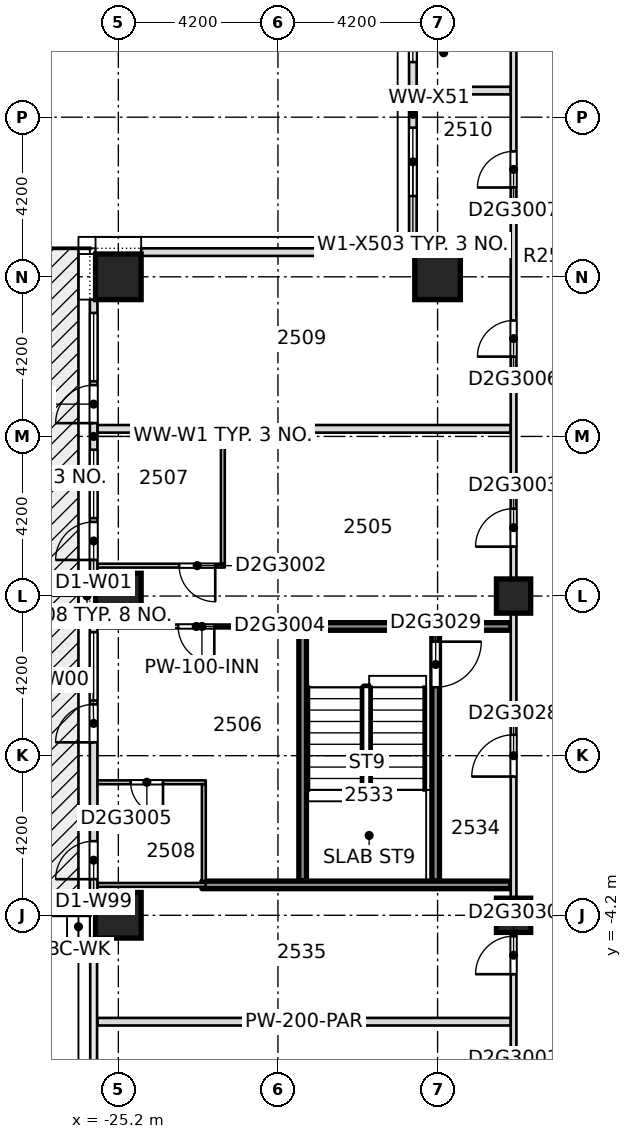
"""IFC4 building model, lengths in metres.
Left out: names, types, materials, properties, quantities, classifications, styles, units other than length and angle.
Written with IfcOpenShell. Run it as: python <this file> out.ifc"""

import sys

from ifc_helpers import new_model, si_unit, direction, frame, frame_2d, origin, origin_2d, place, context, subcontext, project, spatial, rectangle, extrude, element, fill, save


model = new_model("IFC4")
c1 = context("Model", 3, precision=1e-05, world=origin(), true_north=direction((0.0, 1.0)))
c2 = subcontext(c1, "Body", "Model", "MODEL_VIEW")
j1 = project(units=[si_unit("LENGTHUNIT", "METRE"), si_unit("PLANEANGLEUNIT", "RADIAN")], contexts=[c1])
p1 = place(None, origin())
s1 = spatial("IfcSite", under=j1, at=p1, CompositionType="ELEMENT")
p2 = place(p1, origin())
s2 = spatial("IfcBuilding", under=s1, at=p2, CompositionType="ELEMENT")
p3 = place(p2, frame((0.0, 0.0, 101.1)))
s3 = spatial("IfcBuildingStorey", under=s2, at=p3, CompositionType="ELEMENT", Elevation=101.1)
for number, where, z_axis, x_axis in (
    (1, (-25.2, -4.2, -0.32), (0.0, 0.0, 1.0), (1.0, 0.0, 0.0)),
    (2, (-25.2, 4.2, -0.32), (0.0, 0.0, 1.0), (1.0, 0.0, 0.0)),
    (3, (-25.2, 12.6, -0.32), (0.0, 0.0, 1.0), (1.0, 0.0, 0.0)),
    (4, (-16.8, 12.6, -0.32), (0.0, 0.0, 1.0), (1.0, 0.0, 0.0)),
):
    element("IfcColumn", number, at=place(p3, frame(where, z_axis=z_axis, x_axis=x_axis)), inside=s3, PredefinedType="COLUMN", context=c2, shape_type="SweptSolid", body=[
        extrude(rectangle(XDim=1.2, YDim=1.2, at=origin_2d()), origin(), (0.0, 0.0, 1.0), 3.45),
    ])
for number, where, z_axis, x_axis in (
    (5, (-14.8, -4.2, -0.32), (0.0, 0.0, 1.0), (1.0, 0.0, 0.0)),
    (6, (-14.8, 4.2, -0.32), (0.0, 0.0, 1.0), (1.0, 0.0, 0.0)),
):
    element("IfcColumn", number, at=place(p3, frame(where, z_axis=z_axis, x_axis=x_axis)), inside=s3, PredefinedType="COLUMN", context=c2, shape_type="SweptSolid", body=[
        extrude(rectangle(XDim=0.9, YDim=0.9, at=origin_2d()), origin(), (0.0, 0.0, 1.0), 3.45),
    ])
p4 = place(p3, frame((-25.75, -7.0, 0.0), z_axis=(0.0, 0.0, 1.0), x_axis=(1.0, 0.0, 0.0)))
e7 = element("IfcWall", 7, at=p4, inside=s3, PredefinedType="PARTITIONING", context=c2, shape_type="SweptSolid", body=[
    extrude(rectangle(XDim=10.875, YDim=0.2, at=frame_2d((5.438, 0.0))), origin(), (0.0, 0.0, 1.0), 3.13),
])
p5 = place(p3, frame((-25.75, -3.4, 0.0), z_axis=(0.0, 0.0, 1.0), x_axis=(1.0, 0.0, 0.0)))
e8 = element("IfcWall", 8, at=p5, inside=s3, PredefinedType="PARTITIONING", context=c2, shape_type="SweptSolid", body=[
    extrude(rectangle(XDim=2.85, YDim=0.1, at=frame_2d((1.425, 0.0))), origin(), (0.0, 0.0, 1.0), 3.13),
])
p6 = place(p3, frame((-25.75, -0.7, 0.0), z_axis=(0.0, 0.0, 1.0), x_axis=(1.0, 0.0, 0.0)))
e9 = element("IfcWall", 9, at=p6, inside=s3, PredefinedType="PARTITIONING", context=c2, shape_type="SweptSolid", body=[
    extrude(rectangle(XDim=2.85, YDim=0.1, at=frame_2d((1.425, 0.0))), origin(), (0.0, 0.0, 1.0), 3.13),
])
p7 = place(p6, frame((0.875, 0.0, 0.0)))
e10 = element("IfcOpeningElement", 10, at=p7, cuts=e9, PredefinedType="OPENING", context=c2, shape_type="SweptSolid", body=[
    extrude(rectangle(XDim=0.85, YDim=2.1, at=frame_2d((0.425, 1.05))), frame((0.0, 0.06, 0.0), z_axis=(0.0, -1.0, 0.0), x_axis=(1.0, 0.0, 0.0)), (0.0, 0.0, 1.0), 0.12),
])
p8 = place(p3, frame((-25.75, 3.4, 0.0), z_axis=(0.0, 0.0, 1.0), x_axis=(1.0, 0.0, 0.0)))
e11 = element("IfcWall", 11, at=p8, inside=s3, PredefinedType="PARTITIONING", context=c2, shape_type="SweptSolid", body=[
    extrude(rectangle(XDim=5.5, YDim=0.1, at=frame_2d((2.75, 0.0))), origin(), (0.0, 0.0, 1.0), 3.13),
])
p9 = place(p8, frame((2.125, 0.0, 0.0)))
e12 = element("IfcOpeningElement", 12, at=p9, cuts=e11, PredefinedType="OPENING", context=c2, shape_type="SweptSolid", body=[
    extrude(rectangle(XDim=0.95, YDim=2.1, at=frame_2d((0.475, 1.05))), frame((0.0, 0.06, 0.0), z_axis=(0.0, -1.0, 0.0), x_axis=(1.0, 0.0, 0.0)), (0.0, 0.0, 1.0), 0.12),
])
p10 = place(p3, frame((-20.45, 3.4, 0.0), z_axis=(0.0, 0.0, 1.0), x_axis=(1.0, 0.0, 0.0)))
e13 = element("IfcWall", 13, at=p10, inside=s3, PredefinedType="SOLIDWALL", context=c2, shape_type="SweptSolid", body=[
    extrude(rectangle(XDim=5.575, YDim=0.2, at=frame_2d((2.788, 0.0))), origin(), (0.0, 0.0, 1.0), 3.13),
])
p11 = place(p3, frame((-25.75, 5.0, 0.0), z_axis=(0.0, 0.0, 1.0), x_axis=(1.0, 0.0, 0.0)))
e14 = element("IfcWall", 14, at=p11, inside=s3, PredefinedType="PARTITIONING", context=c2, shape_type="SweptSolid", body=[
    extrude(rectangle(XDim=3.35, YDim=0.1, at=frame_2d((1.675, 0.0))), origin(), (0.0, 0.0, 1.0), 3.13),
])
p12 = place(p11, frame((2.15, 0.0, 0.0)))
e15 = element("IfcOpeningElement", 15, at=p12, cuts=e14, PredefinedType="OPENING", context=c2, shape_type="SweptSolid", body=[
    extrude(rectangle(XDim=0.95, YDim=2.1, at=frame_2d((0.475, 1.05))), frame((0.0, 0.06, 0.0), z_axis=(0.0, -1.0, 0.0), x_axis=(1.0, 0.0, 0.0)), (0.0, 0.0, 1.0), 0.12),
])
p13 = place(p3, frame((-25.75, 8.6, 0.0), z_axis=(0.0, 0.0, 1.0), x_axis=(1.0, 0.0, 0.0)))
e16 = element("IfcWall", 16, at=p13, inside=s3, PredefinedType="PARTITIONING", context=c2, shape_type="SweptSolid", body=[
    extrude(rectangle(XDim=10.875, YDim=0.2, at=frame_2d((5.438, 0.0))), origin(), (0.0, 0.0, 1.0), 3.13),
])
for number, where, z_axis, x_axis in (
    (17, (-17.35, 13.35, 0.0), (0.0, 0.0, 1.0), (1.0, 0.0, 0.0)),
    (18, (-17.35, 17.5, 0.0), (0.0, 0.0, 1.0), (1.0, 0.0, 0.0)),
):
    element("IfcWall", number, at=place(p3, frame(where, z_axis=z_axis, x_axis=x_axis)), inside=s3, PredefinedType="PARTITIONING", context=c2, shape_type="SweptSolid", body=[
        extrude(rectangle(XDim=2.475, YDim=0.2, at=frame_2d((1.238, 0.0))), origin(), (0.0, 0.0, 1.0), 3.13),
    ])
p14 = place(p3, frame((-22.95, -3.3, 0.0), z_axis=(0.0, 0.0, 1.0), x_axis=(0.0, 1.0, 0.0)))
e19 = element("IfcWall", 19, at=p14, inside=s3, PredefinedType="PARTITIONING", context=c2, shape_type="SweptSolid", body=[
    extrude(rectangle(XDim=2.55, YDim=0.1, at=frame_2d((1.275, 0.0))), origin(), (0.0, 0.0, 1.0), 3.13),
])
p15 = place(p3, frame((-22.45, 5.05, 0.0), z_axis=(0.0, 0.0, 1.0), x_axis=(0.0, 1.0, 0.0)))
e20 = element("IfcWall", 20, at=p15, inside=s3, PredefinedType="PARTITIONING", context=c2, shape_type="SweptSolid", body=[
    extrude(rectangle(XDim=3.45, YDim=0.1, at=frame_2d((1.725, 0.0))), origin(), (0.0, 0.0, 1.0), 3.13),
])
p16 = place(p3, frame((-20.35, -3.298, 0.0), z_axis=(0.0, 0.0, 1.0), x_axis=(0.0, 1.0, 0.0)))
e21 = element("IfcWall", 21, at=p16, inside=s3, PredefinedType="SOLIDWALL", context=c2, shape_type="SweptSolid", body=[
    extrude(rectangle(XDim=6.598, YDim=0.2, at=frame_2d((3.299, 0.0))), origin(), (0.0, 0.0, 1.0), 3.13),
])
p17 = place(p3, frame((-16.85, -3.3, 0.0), z_axis=(0.0, 0.0, 1.0), x_axis=(0.0, 1.0, 0.0)))
e22 = element("IfcWall", 22, at=p17, inside=s3, PredefinedType="SOLIDWALL", context=c2, shape_type="SweptSolid", body=[
    extrude(rectangle(XDim=6.6, YDim=0.2, at=frame_2d((3.3, 0.0))), origin(), (0.0, 0.0, 1.0), 3.13),
])
p18 = place(p17, frame((5.1, 0.0, 0.0)))
e23 = element("IfcOpeningElement", 23, at=p18, cuts=e22, PredefinedType="OPENING", context=c2, shape_type="SweptSolid", body=[
    extrude(rectangle(XDim=1.2, YDim=2.1, at=frame_2d((0.6, 1.05))), frame((0.0, 0.11, 0.0), z_axis=(0.0, -1.0, 0.0), x_axis=(1.0, 0.0, 0.0)), (0.0, 0.0, 1.0), 0.22),
])
p19 = place(p3, frame((-14.8, -10.6, 0.0), z_axis=(0.0, 0.0, 1.0), x_axis=(0.0, 1.0, 0.0)))
e24 = element("IfcWall", 24, at=p19, inside=s3, PredefinedType="PARTITIONING", context=c2, shape_type="SweptSolid", body=[
    extrude(rectangle(XDim=32.15, YDim=0.15, at=frame_2d((16.075, 0.0))), origin(), (0.0, 0.0, 1.0), 3.13),
])
p20 = place(p19, frame((1.05, 0.0, 0.0)))
e25 = element("IfcOpeningElement", 25, at=p20, cuts=e24, PredefinedType="OPENING", context=c2, shape_type="SweptSolid", body=[
    extrude(rectangle(XDim=0.95, YDim=2.1, at=frame_2d((0.475, 1.05))), frame((0.0, 0.085, 0.0), z_axis=(0.0, -1.0, 0.0), x_axis=(1.0, 0.0, 0.0)), (0.0, 0.0, 1.0), 0.17),
])
p21 = place(p19, frame((16.1, 0.0, 0.0)))
e26 = element("IfcOpeningElement", 26, at=p21, cuts=e24, PredefinedType="OPENING", context=c2, shape_type="SweptSolid", body=[
    extrude(rectangle(XDim=1.0, YDim=2.1, at=frame_2d((0.5, 1.05))), frame((0.0, 0.085, 0.0), z_axis=(0.0, -1.0, 0.0), x_axis=(1.0, 0.0, 0.0)), (0.0, 0.0, 1.0), 0.17),
])
p22 = place(p19, frame((21.1, 0.0, 0.0)))
e27 = element("IfcOpeningElement", 27, at=p22, cuts=e24, PredefinedType="OPENING", context=c2, shape_type="SweptSolid", body=[
    extrude(rectangle(XDim=0.95, YDim=2.1, at=frame_2d((0.475, 1.05))), frame((0.0, 0.085, 0.0), z_axis=(0.0, -1.0, 0.0), x_axis=(1.0, 0.0, 0.0)), (0.0, 0.0, 1.0), 0.17),
])
p23 = place(p19, frame((25.55, 0.0, 0.0)))
e28 = element("IfcOpeningElement", 28, at=p23, cuts=e24, PredefinedType="OPENING", context=c2, shape_type="SweptSolid", body=[
    extrude(rectangle(XDim=0.95, YDim=2.1, at=frame_2d((0.475, 1.05))), frame((0.0, 0.085, 0.0), z_axis=(0.0, -1.0, 0.0), x_axis=(1.0, 0.0, 0.0)), (0.0, 0.0, 1.0), 0.17),
])
p24 = place(p19, frame((29.45, 0.0, 0.0)))
e29 = element("IfcOpeningElement", 29, at=p24, cuts=e24, PredefinedType="OPENING", context=c2, shape_type="SweptSolid", body=[
    extrude(rectangle(XDim=0.95, YDim=2.1, at=frame_2d((0.475, 1.05))), frame((0.0, 0.085, 0.0), z_axis=(0.0, -1.0, 0.0), x_axis=(1.0, 0.0, 0.0)), (0.0, 0.0, 1.0), 0.17),
])
p25 = place(p19, frame((10.05, 0.0, 0.0)))
e30 = element("IfcOpeningElement", 30, at=p25, cuts=e24, PredefinedType="OPENING", context=c2, shape_type="SweptSolid", body=[
    extrude(rectangle(XDim=1.1, YDim=2.1, at=frame_2d((0.55, 1.05))), frame((0.0, 0.085, 0.0), z_axis=(0.0, -1.0, 0.0), x_axis=(1.0, 0.0, 0.0)), (0.0, 0.0, 1.0), 0.17),
])
p26 = place(p19, frame((4.85, 0.0, 0.0)))
e31 = element("IfcOpeningElement", 31, at=p26, cuts=e24, PredefinedType="OPENING", context=c2, shape_type="SweptSolid", body=[
    extrude(rectangle(XDim=1.0, YDim=2.1, at=frame_2d((0.5, 1.05))), frame((0.0, 0.085, 0.0), z_axis=(0.0, -1.0, 0.0), x_axis=(1.0, 0.0, 0.0)), (0.0, 0.0, 1.0), 0.17),
])
p27 = place(p3, frame((-17.45, 20.4, 0.0), z_axis=(0.0, 0.0, 1.0), x_axis=(0.0, -1.0, 0.0)))
e32 = element("IfcWall", 32, at=p27, inside=s3, PredefinedType="STANDARD", context=c2, shape_type="SweptSolid", body=[
    extrude(rectangle(XDim=7.05, YDim=0.2, at=frame_2d((3.525, 0.0))), origin(), (0.0, 0.0, 1.0), 3.13),
])
p28 = place(p27, frame((3.875, 0.0, 0.2)))
e33 = element("IfcOpeningElement", 33, at=p28, cuts=e32, PredefinedType="OPENING", context=c2, shape_type="SweptSolid", body=[
    extrude(rectangle(XDim=1.8, YDim=2.65, at=frame_2d((0.9, 1.325))), frame((0.0, 0.11, 0.0), z_axis=(0.0, -1.0, 0.0), x_axis=(1.0, 0.0, 0.0)), (0.0, 0.0, 1.0), 0.22),
])
p29 = place(p27, frame((0.35, 0.0, 0.2)))
e34 = element("IfcOpeningElement", 34, at=p29, cuts=e32, PredefinedType="OPENING", context=c2, shape_type="SweptSolid", body=[
    extrude(rectangle(XDim=1.8, YDim=2.65, at=frame_2d((0.9, 1.325))), frame((0.0, 0.11, 0.0), z_axis=(0.0, -1.0, 0.0), x_axis=(1.0, 0.0, 0.0)), (0.0, 0.0, 1.0), 0.22),
])
p30 = place(p3, frame((-17.55, 13.25, 0.0), z_axis=(0.0, 0.0, 1.0), x_axis=(-1.0, 0.0, 0.0)))
e35 = element("IfcWall", 35, at=p30, inside=s3, PredefinedType="STANDARD", context=c2, shape_type="SweptSolid", body=[
    extrude(rectangle(XDim=7.05, YDim=0.2, at=frame_2d((3.525, 0.0))), origin(), (0.0, 0.0, 1.0), 3.13),
])
p31 = place(p3, frame((-25.85, 12.0, 0.0), z_axis=(0.0, 0.0, 1.0), x_axis=(0.0, -1.0, 0.0)))
e36 = element("IfcWall", 36, at=p31, inside=s3, PredefinedType="STANDARD", context=c2, shape_type="SweptSolid", body=[
    extrude(rectangle(XDim=7.2, YDim=0.2, at=frame_2d((3.6, 0.0))), origin(), (0.0, 0.0, 1.0), 3.13),
])
p32 = place(p31, frame((3.95, 0.0, 0.2)))
e37 = element("IfcOpeningElement", 37, at=p32, cuts=e36, PredefinedType="OPENING", context=c2, shape_type="SweptSolid", body=[
    extrude(rectangle(XDim=1.8, YDim=2.65, at=frame_2d((0.9, 1.325))), frame((0.0, 0.11, 0.0), z_axis=(0.0, -1.0, 0.0), x_axis=(1.0, 0.0, 0.0)), (0.0, 0.0, 1.0), 0.22),
])
p33 = place(p31, frame((5.85, 0.0, 0.0)))
e38 = element("IfcOpeningElement", 38, at=p33, cuts=e36, PredefinedType="OPENING", context=c2, shape_type="SweptSolid", body=[
    extrude(rectangle(XDim=1.0, YDim=2.4, at=frame_2d((0.5, 1.2))), frame((0.0, 0.11, 0.0), z_axis=(0.0, -1.0, 0.0), x_axis=(1.0, 0.0, 0.0)), (0.0, 0.0, 1.0), 0.22),
])
p34 = place(p31, frame((0.35, 0.0, 0.2)))
e39 = element("IfcOpeningElement", 39, at=p34, cuts=e36, PredefinedType="OPENING", context=c2, shape_type="SweptSolid", body=[
    extrude(rectangle(XDim=1.8, YDim=2.65, at=frame_2d((0.9, 1.325))), frame((0.0, 0.11, 0.0), z_axis=(0.0, -1.0, 0.0), x_axis=(1.0, 0.0, 0.0)), (0.0, 0.0, 1.0), 0.22),
])
p35 = place(p31, frame((2.25, 0.0, 0.0)))
e40 = element("IfcOpeningElement", 40, at=p35, cuts=e36, PredefinedType="OPENING", context=c2, shape_type="SweptSolid", body=[
    extrude(rectangle(XDim=1.0, YDim=2.4, at=frame_2d((0.5, 1.2))), frame((0.0, 0.11, 0.0), z_axis=(0.0, -1.0, 0.0), x_axis=(1.0, 0.0, 0.0)), (0.0, 0.0, 1.0), 0.22),
])
p36 = place(p3, frame((-25.85, 3.6, 0.0), z_axis=(0.0, 0.0, 1.0), x_axis=(0.0, -1.0, 0.0)))
e41 = element("IfcWall", 41, at=p36, inside=s3, PredefinedType="STANDARD", context=c2, shape_type="SweptSolid", body=[
    extrude(rectangle(XDim=7.2, YDim=0.2, at=frame_2d((3.6, 0.0))), origin(), (0.0, 0.0, 1.0), 3.13),
])
p37 = place(p36, frame((5.85, 0.0, 0.0)))
e42 = element("IfcOpeningElement", 42, at=p37, cuts=e41, PredefinedType="OPENING", context=c2, shape_type="SweptSolid", body=[
    extrude(rectangle(XDim=1.0, YDim=2.4, at=frame_2d((0.5, 1.2))), frame((0.0, 0.11, 0.0), z_axis=(0.0, -1.0, 0.0), x_axis=(1.0, 0.0, 0.0)), (0.0, 0.0, 1.0), 0.22),
])
p38 = place(p36, frame((0.35, 0.0, 0.2)))
e43 = element("IfcOpeningElement", 43, at=p38, cuts=e41, PredefinedType="OPENING", context=c2, shape_type="SweptSolid", body=[
    extrude(rectangle(XDim=1.8, YDim=2.65, at=frame_2d((0.9, 1.325))), frame((0.0, 0.11, 0.0), z_axis=(0.0, -1.0, 0.0), x_axis=(1.0, 0.0, 0.0)), (0.0, 0.0, 1.0), 0.22),
])
p39 = place(p36, frame((2.25, 0.0, 0.0)))
e44 = element("IfcOpeningElement", 44, at=p39, cuts=e41, PredefinedType="OPENING", context=c2, shape_type="SweptSolid", body=[
    extrude(rectangle(XDim=1.0, YDim=2.4, at=frame_2d((0.5, 1.2))), frame((0.0, 0.11, 0.0), z_axis=(0.0, -1.0, 0.0), x_axis=(1.0, 0.0, 0.0)), (0.0, 0.0, 1.0), 0.22),
])
p40 = place(p3, frame((-23.0, -3.4, 0.0), z_axis=(0.0, 0.0, 1.0), x_axis=(1.0, 0.0, 0.0)))
e45 = element("IfcWall", 45, at=p40, inside=s3, PredefinedType="SOLIDWALL", context=c2, shape_type="SweptSolid", body=[
    extrude(rectangle(XDim=8.123, YDim=0.2, at=frame_2d((4.062, 0.0))), origin(), (0.0, 0.0, 1.0), 3.13),
])
p41 = place(p12, origin())
e46 = element("IfcDoor", 46, at=p41, inside=s3, OperationType="SINGLE_SWING_RIGHT", PredefinedType="DOOR", context=c2, shape_type="SweptSolid", body=[
    extrude(rectangle(XDim=0.95, YDim=2.1, at=frame_2d((0.475, 1.05))), frame((0.0, 0.025, 0.0), z_axis=(0.0, -1.0, 0.0), x_axis=(1.0, 0.0, 0.0)), (0.0, 0.0, 1.0), 0.05),
])
fill(e15, e46)
p42 = place(p21, origin())
e47 = element("IfcDoor", 47, at=p42, inside=s3, OperationType="SINGLE_SWING_LEFT", PredefinedType="DOOR", context=c2, shape_type="SweptSolid", body=[
    extrude(rectangle(XDim=1.0, YDim=2.1, at=frame_2d((0.5, 1.05))), frame((0.0, 0.025, 0.0), z_axis=(0.0, -1.0, 0.0), x_axis=(1.0, 0.0, 0.0)), (0.0, 0.0, 1.0), 0.05),
])
fill(e26, e47)
p43 = place(p9, origin())
e48 = element("IfcDoor", 48, at=p43, inside=s3, OperationType="SINGLE_SWING_LEFT", PredefinedType="DOOR", context=c2, shape_type="SweptSolid", body=[
    extrude(rectangle(XDim=0.95, YDim=2.1, at=frame_2d((0.475, 1.05))), frame((0.0, 0.025, 0.0), z_axis=(0.0, -1.0, 0.0), x_axis=(1.0, 0.0, 0.0)), (0.0, 0.0, 1.0), 0.05),
])
fill(e12, e48)
p44 = place(p7, origin())
e49 = element("IfcDoor", 49, at=p44, inside=s3, OperationType="SINGLE_SWING_RIGHT", PredefinedType="DOOR", context=c2, shape_type="SweptSolid", body=[
    extrude(rectangle(XDim=0.85, YDim=2.1, at=frame_2d((0.425, 1.05))), frame((0.0, 0.025, 0.0), z_axis=(0.0, -1.0, 0.0), x_axis=(1.0, 0.0, 0.0)), (0.0, 0.0, 1.0), 0.05),
])
fill(e10, e49)
p45 = place(p22, origin())
e50 = element("IfcDoor", 50, at=p45, inside=s3, OperationType="SINGLE_SWING_RIGHT", PredefinedType="DOOR", context=c2, shape_type="SweptSolid", body=[
    extrude(rectangle(XDim=0.95, YDim=2.1, at=frame_2d((0.475, 1.05))), frame((0.0, 0.025, 0.0), z_axis=(0.0, -1.0, 0.0), x_axis=(1.0, 0.0, 0.0)), (0.0, 0.0, 1.0), 0.05),
])
fill(e27, e50)
p46 = place(p23, origin())
e51 = element("IfcDoor", 51, at=p46, inside=s3, OperationType="SINGLE_SWING_LEFT", PredefinedType="DOOR", context=c2, shape_type="SweptSolid", body=[
    extrude(rectangle(XDim=0.95, YDim=2.1, at=frame_2d((0.475, 1.05))), frame((0.0, 0.025, 0.0), z_axis=(0.0, -1.0, 0.0), x_axis=(1.0, 0.0, 0.0)), (0.0, 0.0, 1.0), 0.05),
])
fill(e28, e51)
p47 = place(p25, origin())
e52 = element("IfcDoor", 52, at=p47, inside=s3, OperationType="SINGLE_SWING_RIGHT", PredefinedType="DOOR", context=c2, shape_type="SweptSolid", body=[
    extrude(rectangle(XDim=1.1, YDim=2.1, at=frame_2d((0.55, 1.05))), frame((0.0, 0.025, 0.0), z_axis=(0.0, -1.0, 0.0), x_axis=(1.0, 0.0, 0.0)), (0.0, 0.0, 1.0), 0.05),
])
fill(e30, e52)
p48 = place(p18, origin())
e53 = element("IfcDoor", 53, at=p48, inside=s3, OperationType="SINGLE_SWING_RIGHT", PredefinedType="DOOR", context=c2, shape_type="SweptSolid", body=[
    extrude(rectangle(XDim=1.2, YDim=2.1, at=frame_2d((0.6, 1.05))), frame((0.0, 0.025, 0.0), z_axis=(0.0, -1.0, 0.0), x_axis=(1.0, 0.0, 0.0)), (0.0, 0.0, 1.0), 0.05),
])
fill(e23, e53)
p49 = place(p26, origin())
e54 = element("IfcDoor", 54, at=p49, inside=s3, OperationType="SINGLE_SWING_RIGHT", PredefinedType="DOOR", context=c2, shape_type="SweptSolid", body=[
    extrude(rectangle(XDim=1.0, YDim=2.1, at=frame_2d((0.5, 1.05))), frame((0.0, 0.025, 0.0), z_axis=(0.0, -1.0, 0.0), x_axis=(1.0, 0.0, 0.0)), (0.0, 0.0, 1.0), 0.05),
])
fill(e31, e54)
p50 = place(p28, origin())
e55 = element("IfcWindow", 55, at=p50, inside=s3, PartitioningType="SINGLE_PANEL", PredefinedType="WINDOW", context=c2, shape_type="SweptSolid", body=[
    extrude(rectangle(XDim=1.8, YDim=2.65, at=frame_2d((0.9, 1.325))), frame((0.0, 0.03, 0.0), z_axis=(0.0, -1.0, 0.0), x_axis=(1.0, 0.0, 0.0)), (0.0, 0.0, 1.0), 0.06),
])
fill(e33, e55)
p51 = place(p29, origin())
e56 = element("IfcWindow", 56, at=p51, inside=s3, PartitioningType="SINGLE_PANEL", PredefinedType="WINDOW", context=c2, shape_type="SweptSolid", body=[
    extrude(rectangle(XDim=1.8, YDim=2.65, at=frame_2d((0.9, 1.325))), frame((0.0, 0.03, 0.0), z_axis=(0.0, -1.0, 0.0), x_axis=(1.0, 0.0, 0.0)), (0.0, 0.0, 1.0), 0.06),
])
fill(e34, e56)
p52 = place(p32, origin())
e57 = element("IfcWindow", 57, at=p52, inside=s3, PartitioningType="SINGLE_PANEL", PredefinedType="WINDOW", context=c2, shape_type="SweptSolid", body=[
    extrude(rectangle(XDim=1.8, YDim=2.65, at=frame_2d((0.9, 1.325))), frame((0.0, 0.03, 0.0), z_axis=(0.0, -1.0, 0.0), x_axis=(1.0, 0.0, 0.0)), (0.0, 0.0, 1.0), 0.06),
])
fill(e37, e57)
p53 = place(p33, origin())
e58 = element("IfcDoor", 58, at=p53, inside=s3, OperationType="SINGLE_SWING_LEFT", PredefinedType="DOOR", context=c2, shape_type="SweptSolid", body=[
    extrude(rectangle(XDim=1.0, YDim=2.4, at=frame_2d((0.5, 1.2))), frame((0.0, 0.025, 0.0), z_axis=(0.0, -1.0, 0.0), x_axis=(1.0, 0.0, 0.0)), (0.0, 0.0, 1.0), 0.05),
])
fill(e38, e58)
p54 = place(p34, origin())
e59 = element("IfcWindow", 59, at=p54, inside=s3, PartitioningType="SINGLE_PANEL", PredefinedType="WINDOW", context=c2, shape_type="SweptSolid", body=[
    extrude(rectangle(XDim=1.8, YDim=2.65, at=frame_2d((0.9, 1.325))), frame((0.0, 0.03, 0.0), z_axis=(0.0, -1.0, 0.0), x_axis=(1.0, 0.0, 0.0)), (0.0, 0.0, 1.0), 0.06),
])
fill(e39, e59)
p55 = place(p35, origin())
e60 = element("IfcDoor", 60, at=p55, inside=s3, OperationType="SINGLE_SWING_LEFT", PredefinedType="DOOR", context=c2, shape_type="SweptSolid", body=[
    extrude(rectangle(XDim=1.0, YDim=2.4, at=frame_2d((0.5, 1.2))), frame((0.0, 0.025, 0.0), z_axis=(0.0, -1.0, 0.0), x_axis=(1.0, 0.0, 0.0)), (0.0, 0.0, 1.0), 0.05),
])
fill(e40, e60)
p56 = place(p37, origin())
e61 = element("IfcDoor", 61, at=p56, inside=s3, OperationType="SINGLE_SWING_LEFT", PredefinedType="DOOR", context=c2, shape_type="SweptSolid", body=[
    extrude(rectangle(XDim=1.0, YDim=2.4, at=frame_2d((0.5, 1.2))), frame((0.0, 0.025, 0.0), z_axis=(0.0, -1.0, 0.0), x_axis=(1.0, 0.0, 0.0)), (0.0, 0.0, 1.0), 0.05),
])
fill(e42, e61)
p57 = place(p38, origin())
e62 = element("IfcWindow", 62, at=p57, inside=s3, PartitioningType="SINGLE_PANEL", PredefinedType="WINDOW", context=c2, shape_type="SweptSolid", body=[
    extrude(rectangle(XDim=1.8, YDim=2.65, at=frame_2d((0.9, 1.325))), frame((0.0, 0.03, 0.0), z_axis=(0.0, -1.0, 0.0), x_axis=(1.0, 0.0, 0.0)), (0.0, 0.0, 1.0), 0.06),
])
fill(e43, e62)
p58 = place(p39, origin())
e63 = element("IfcDoor", 63, at=p58, inside=s3, OperationType="SINGLE_SWING_LEFT", PredefinedType="DOOR", context=c2, shape_type="SweptSolid", body=[
    extrude(rectangle(XDim=1.0, YDim=2.4, at=frame_2d((0.5, 1.2))), frame((0.0, 0.025, 0.0), z_axis=(0.0, -1.0, 0.0), x_axis=(1.0, 0.0, 0.0)), (0.0, 0.0, 1.0), 0.05),
])
fill(e44, e63)
save(model, sys.argv[1])
